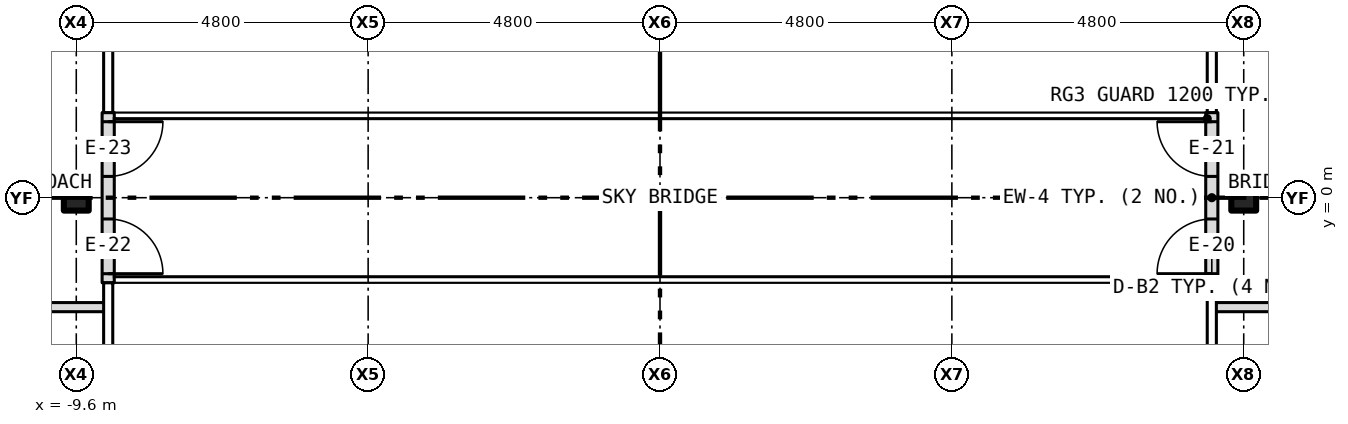
"""IFC4 building model, lengths in metres.
Left out: names, types, materials, properties, quantities, classifications, styles, units other than length and angle.
Written with IfcOpenShell. Run it as: python <this file> out.ifc"""

import sys

from ifc_helpers import new_model, si_unit, direction, frame, frame_2d, origin, origin_2d, place, context, subcontext, project, spatial, rectangle, i_section, extrude, element, fill, save


model = new_model("IFC4")
c1 = context("Model", 3, precision=1e-05, world=origin(), true_north=direction((0.0, 1.0)))
c2 = subcontext(c1, "Body", "Model", "MODEL_VIEW")
j1 = project(units=[si_unit("LENGTHUNIT", "METRE"), si_unit("PLANEANGLEUNIT", "RADIAN")], contexts=[c1])
p1 = place(None, origin())
s1 = spatial("IfcSite", under=j1, at=p1, CompositionType="ELEMENT")
p2 = place(p1, origin())
s2 = spatial("IfcBuilding", under=s1, at=p2, CompositionType="ELEMENT")
p3 = place(p2, frame((0.0, 0.0, 63.5)))
s3 = spatial("IfcBuildingStorey", under=s2, at=p3, CompositionType="ELEMENT", Elevation=63.5)
for number, where, z_axis, x_axis in (
    (1, (-9.6, 0.0, -0.15), (0.0, 0.0, 1.0), (1.0, 0.0, 0.0)),
    (2, (9.6, 0.0, -0.15), (0.0, 0.0, 1.0), (1.0, 0.0, 0.0)),
):
    element("IfcColumn", number, at=place(p3, frame(where, z_axis=z_axis, x_axis=x_axis)), inside=s3, PredefinedType="COLUMN", context=c2, shape_type="SweptSolid", body=[
        extrude(i_section(OverallWidth=0.409, OverallDepth=0.424, WebThickness=0.033, FlangeThickness=0.052, at=origin_2d()), origin(), (0.0, 0.0, 1.0), 3.5),
    ])
p4 = place(p3, frame((9.075, -1.4, 0.0), z_axis=(0.0, 0.0, 1.0), x_axis=(0.0, 1.0, 0.0)))
e3 = element("IfcWall", 3, at=p4, inside=s3, PredefinedType="SOLIDWALL", context=c2, shape_type="SweptSolid", body=[
    extrude(rectangle(XDim=2.8, YDim=0.2, at=frame_2d((1.4, 0.0))), origin(), (0.0, 0.0, 1.0), 3.5),
])
p5 = place(p4, frame((0.15, 0.0, 0.0)))
e4 = element("IfcOpeningElement", 4, at=p5, cuts=e3, PredefinedType="OPENING", context=c2, shape_type="SweptSolid", body=[
    extrude(rectangle(XDim=0.9, YDim=2.1, at=frame_2d((0.45, 1.05))), frame((0.0, 0.112, 0.0), z_axis=(0.0, -1.0, 0.0), x_axis=(1.0, 0.0, 0.0)), (0.0, 0.0, 1.0), 0.224),
])
p6 = place(p4, frame((1.75, 0.0, 0.0)))
e5 = element("IfcOpeningElement", 5, at=p6, cuts=e3, PredefinedType="OPENING", context=c2, shape_type="SweptSolid", body=[
    extrude(rectangle(XDim=0.9, YDim=2.1, at=frame_2d((0.45, 1.05))), frame((0.0, 0.112, 0.0), z_axis=(0.0, -1.0, 0.0), x_axis=(1.0, 0.0, 0.0)), (0.0, 0.0, 1.0), 0.224),
])
p7 = place(p3, frame((-9.075, -1.4, 0.0), z_axis=(0.0, 0.0, 1.0), x_axis=(0.0, 1.0, 0.0)))
e6 = element("IfcWall", 6, at=p7, inside=s3, PredefinedType="SOLIDWALL", context=c2, shape_type="SweptSolid", body=[
    extrude(rectangle(XDim=2.8, YDim=0.2, at=frame_2d((1.4, 0.0))), origin(), (0.0, 0.0, 1.0), 3.5),
])
p8 = place(p7, frame((0.15, 0.0, 0.0)))
e7 = element("IfcOpeningElement", 7, at=p8, cuts=e6, PredefinedType="OPENING", context=c2, shape_type="SweptSolid", body=[
    extrude(rectangle(XDim=0.9, YDim=2.1, at=frame_2d((0.45, 1.05))), frame((0.0, 0.112, 0.0), z_axis=(0.0, -1.0, 0.0), x_axis=(1.0, 0.0, 0.0)), (0.0, 0.0, 1.0), 0.224),
])
p9 = place(p7, frame((1.75, 0.0, 0.0)))
e8 = element("IfcOpeningElement", 8, at=p9, cuts=e6, PredefinedType="OPENING", context=c2, shape_type="SweptSolid", body=[
    extrude(rectangle(XDim=0.9, YDim=2.1, at=frame_2d((0.45, 1.05))), frame((0.0, 0.112, 0.0), z_axis=(0.0, -1.0, 0.0), x_axis=(1.0, 0.0, 0.0)), (0.0, 0.0, 1.0), 0.224),
])
for number, where, z_axis, x_axis in (
    (9, (-12.4, -1.8, 0.0), (0.0, 0.0, 1.0), (1.0, 0.0, 0.0)),
    (10, (9.12, -1.8, 0.0), (0.0, 0.0, 1.0), (1.0, 0.0, 0.0)),
):
    element("IfcWall", number, at=place(p3, frame(where, z_axis=z_axis, x_axis=x_axis)), inside=s3, PredefinedType="PARTITIONING", context=c2, shape_type="SweptSolid", body=[
        extrude(rectangle(XDim=3.28, YDim=0.15, at=frame_2d((1.64, 0.0))), origin(), (0.0, 0.0, 1.0), 3.35),
    ])
p10 = place(p5, origin())
e11 = element("IfcDoor", 11, at=p10, inside=s3, OperationType="SINGLE_SWING_LEFT", PredefinedType="DOOR", context=c2, shape_type="SweptSolid", body=[
    extrude(rectangle(XDim=0.9, YDim=2.1, at=frame_2d((0.45, 1.05))), frame((0.0, 0.025, 0.0), z_axis=(0.0, -1.0, 0.0), x_axis=(1.0, 0.0, 0.0)), (0.0, 0.0, 1.0), 0.05),
])
fill(e4, e11)
p11 = place(p6, origin())
e12 = element("IfcDoor", 12, at=p11, inside=s3, OperationType="SINGLE_SWING_RIGHT", PredefinedType="DOOR", context=c2, shape_type="SweptSolid", body=[
    extrude(rectangle(XDim=0.9, YDim=2.1, at=frame_2d((0.45, 1.05))), frame((0.0, 0.025, 0.0), z_axis=(0.0, -1.0, 0.0), x_axis=(1.0, 0.0, 0.0)), (0.0, 0.0, 1.0), 0.05),
])
fill(e5, e12)
p12 = place(p8, origin())
e13 = element("IfcDoor", 13, at=p12, inside=s3, OperationType="SINGLE_SWING_LEFT", PredefinedType="DOOR", context=c2, shape_type="SweptSolid", body=[
    extrude(rectangle(XDim=0.9, YDim=2.1, at=frame_2d((0.45, 1.05))), frame((0.0, 0.025, 0.0), z_axis=(0.0, -1.0, 0.0), x_axis=(1.0, 0.0, 0.0)), (0.0, 0.0, 1.0), 0.05),
])
fill(e7, e13)
p13 = place(p9, origin())
e14 = element("IfcDoor", 14, at=p13, inside=s3, OperationType="SINGLE_SWING_RIGHT", PredefinedType="DOOR", context=c2, shape_type="SweptSolid", body=[
    extrude(rectangle(XDim=0.9, YDim=2.1, at=frame_2d((0.45, 1.05))), frame((0.0, 0.025, 0.0), z_axis=(0.0, -1.0, 0.0), x_axis=(1.0, 0.0, 0.0)), (0.0, 0.0, 1.0), 0.05),
])
fill(e8, e14)
save(model, sys.argv[1])
